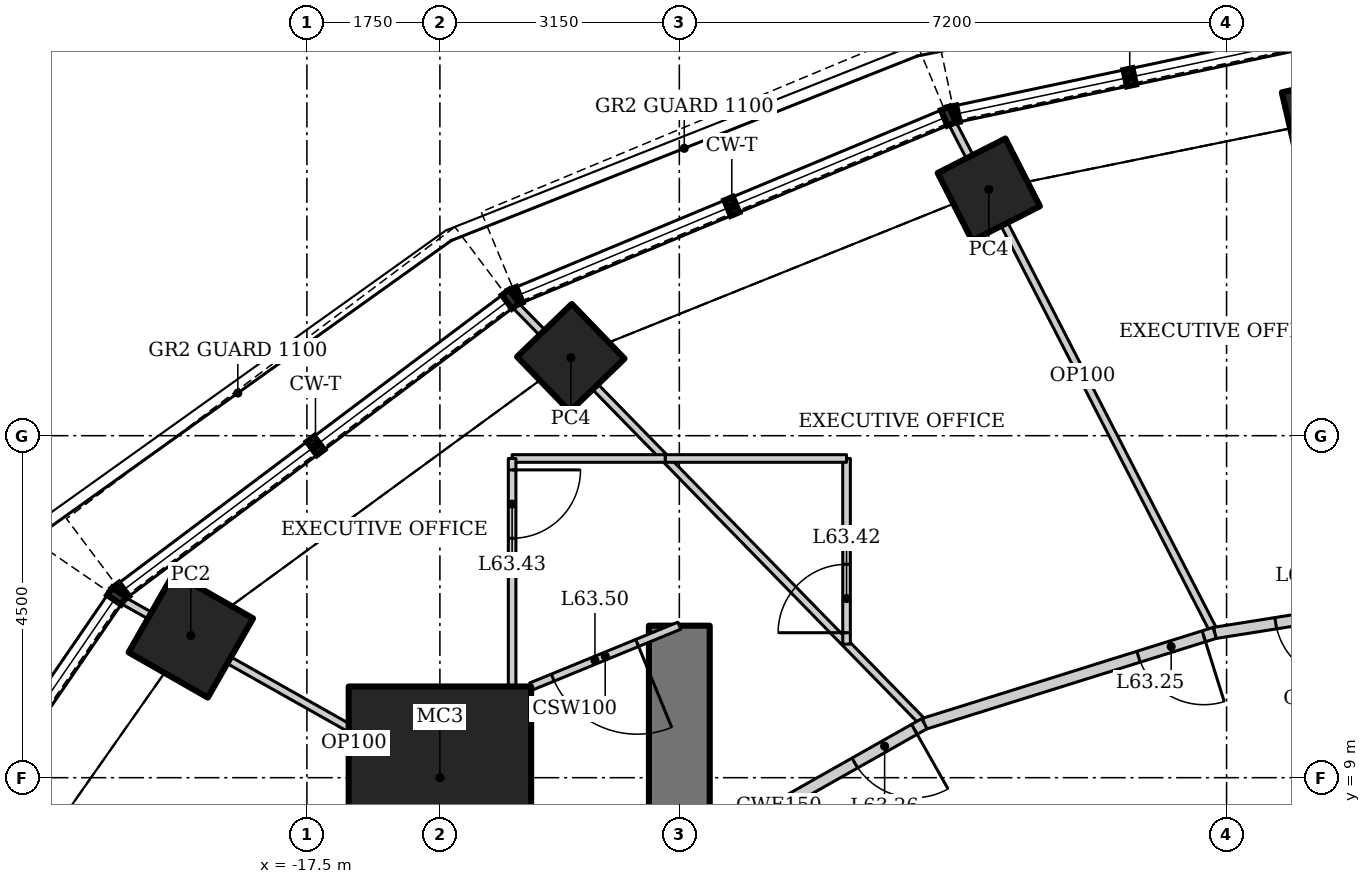
"""IFC4 building model, lengths in metres.
Left out: names, types, materials, properties, quantities, classifications, styles, units other than length and angle.
Written with IfcOpenShell. Run it as: python <this file> out.ifc"""

import sys

from ifc_helpers import new_model, si_unit, direction, frame, frame_2d, origin, origin_2d, place, context, subcontext, project, spatial, rectangle, hollow_rectangle, extrude, element, fill, save


model = new_model("IFC4")
c1 = context("Model", 3, precision=1e-05, world=origin(), true_north=direction((0.0, 1.0)))
c2 = subcontext(c1, "Body", "Model", "MODEL_VIEW")
j1 = project(units=[si_unit("LENGTHUNIT", "METRE"), si_unit("PLANEANGLEUNIT", "RADIAN")], contexts=[c1])
p1 = place(None, origin())
s1 = spatial("IfcSite", under=j1, at=p1, CompositionType="ELEMENT")
p2 = place(p1, origin())
s2 = spatial("IfcBuilding", under=s1, at=p2, CompositionType="ELEMENT")
p3 = place(p2, frame((0.0, 0.0, 270.4)))
s3 = spatial("IfcBuildingStorey", under=s2, at=p3, CompositionType="ELEMENT", Elevation=270.4)
p4 = place(p3, frame((-15.75, 9.0, 0.0), z_axis=(0.0, 0.0, 1.0), x_axis=(1.0, 0.0, 0.0)))
e1 = element("IfcColumn", 1, at=p4, inside=s3, PredefinedType="COLUMN", context=c2, shape_type="SweptSolid", body=[
    extrude(hollow_rectangle(XDim=2.4, YDim=2.4, WallThickness=0.12, at=origin_2d()), origin(), (0.0, 0.0, 1.0), 4.5),
])
p5 = place(p3, frame((-4.073, 17.642, 0.979), z_axis=(0.0, 0.0, 1.0), x_axis=(0.974370064785, 0.224951054344, 0.0)))
e2 = element("IfcColumn", 2, at=p5, inside=s3, PredefinedType="COLUMN", context=c2, shape_type="SweptSolid", body=[
    extrude(hollow_rectangle(XDim=1.0, YDim=1.0, WallThickness=0.08, at=origin_2d()), origin(), (0.0, 0.0, 1.0), 3.521),
])
p6 = place(p3, frame((-8.528, 16.738, 0.969), z_axis=(0.0, 0.0, 1.0), x_axis=(0.891006524188, 0.45399049974, 0.0)))
e3 = element("IfcColumn", 3, at=p6, inside=s3, PredefinedType="COLUMN", context=c2, shape_type="SweptSolid", body=[
    extrude(hollow_rectangle(XDim=1.0, YDim=1.0, WallThickness=0.08, at=origin_2d()), origin(), (0.0, 0.0, 1.0), 3.531),
])
p7 = place(p3, frame((-14.028, 14.526, 0.947), z_axis=(0.0, 0.0, 1.0), x_axis=(0.719339800339, 0.694658370459, 0.0)))
e4 = element("IfcColumn", 4, at=p7, inside=s3, PredefinedType="COLUMN", context=c2, shape_type="SweptSolid", body=[
    extrude(hollow_rectangle(XDim=1.0, YDim=1.0, WallThickness=0.08, at=origin_2d()), origin(), (0.0, 0.0, 1.0), 3.553),
])
p8 = place(p3, frame((-19.027, 10.873, 1.103), z_axis=(0.0, 0.0, 1.0), x_axis=(0.496139221777, 0.86824298017, 0.0)))
e5 = element("IfcColumn", 5, at=p8, inside=s3, PredefinedType="COLUMN", context=c2, shape_type="SweptSolid", body=[
    extrude(hollow_rectangle(XDim=1.2, YDim=1.2, WallThickness=0.1, at=origin_2d()), origin(), (0.0, 0.0, 1.0), 3.397),
])
p9 = place(p3, frame((-12.6, 11.0, 0.0), z_axis=(0.0, 0.0, 1.0), x_axis=(0.0, -1.0, 0.0)))
e6 = element("IfcWall", 6, at=p9, inside=s3, PredefinedType="SHEAR", context=c2, shape_type="SweptSolid", body=[
    extrude(rectangle(XDim=22.0, YDim=0.8, at=frame_2d((11.0, 0.0))), origin(), (0.0, 0.0, 1.0), 4.5),
])
p10 = place(p9, frame((10.1, 0.0, 0.0)))
e7 = element("IfcOpeningElement", 7, at=p10, cuts=e6, PredefinedType="OPENING", context=c2, shape_type="SweptSolid", body=[
    extrude(rectangle(XDim=1.8, YDim=2.1, at=frame_2d((0.9, 1.05))), frame((0.0, 0.41, 0.0), z_axis=(0.0, -1.0, 0.0), x_axis=(1.0, 0.0, 0.0)), (0.0, 0.0, 1.0), 0.82),
])
p11 = place(p3, frame((-9.031, 17.657, 0.0), z_axis=(0.0, 0.0, 1.0), x_axis=(0.457536153323, -0.889191019074, 0.0)))
e8 = element("IfcWall", 8, at=p11, inside=s3, PredefinedType="PARTITIONING", context=c2, shape_type="SweptSolid", body=[
    extrude(rectangle(XDim=7.594, YDim=0.1, at=frame_2d((3.797, 0.0))), origin(), (0.0, 0.0, 1.0), 3.408),
])
p12 = place(p3, frame((-14.789, 15.251, 0.0), z_axis=(0.0, 0.0, 1.0), x_axis=(0.698752653188, -0.71536335499, 0.0)))
e9 = element("IfcWall", 9, at=p12, inside=s3, PredefinedType="PARTITIONING", context=c2, shape_type="SweptSolid", body=[
    extrude(rectangle(XDim=7.746, YDim=0.1, at=frame_2d((3.873, 0.0))), origin(), (0.0, 0.0, 1.0), 3.723),
])
p13 = place(p3, frame((-19.959, 11.355, 0.0), z_axis=(0.0, 0.0, 1.0), x_axis=(0.871035125561, -0.491220734537, 0.0)))
e10 = element("IfcWall", 10, at=p13, inside=s3, PredefinedType="PARTITIONING", context=c2, shape_type="SweptSolid", body=[
    extrude(rectangle(XDim=7.753, YDim=0.1, at=frame_2d((3.877, 0.0))), origin(), (0.0, 0.0, 1.0), 3.824),
])
p14 = place(p3, frame((-2.625, 11.37, 0.0), z_axis=(0.0, 0.0, 1.0), x_axis=(-0.987659371348, -0.156617260185, 0.0)))
e11 = element("IfcWall", 11, at=p14, inside=s3, PredefinedType="PARTITIONING", context=c2, shape_type="SweptSolid", body=[
    extrude(rectangle(XDim=2.968, YDim=0.15, at=frame_2d((1.484, 0.0))), origin(), (0.0, 0.0, 1.0), 4.35),
])
p15 = place(p14, frame((1.255, 0.0, 0.0)))
e12 = element("IfcOpeningElement", 12, at=p15, cuts=e11, PredefinedType="OPENING", context=c2, shape_type="SweptSolid", body=[
    extrude(rectangle(XDim=0.9, YDim=2.1, at=frame_2d((0.45, 1.05))), frame((0.0, 0.085, 0.0), z_axis=(0.0, -1.0, 0.0), x_axis=(1.0, 0.0, 0.0)), (0.0, 0.0, 1.0), 0.17),
])
p16 = place(p3, frame((-5.556, 10.905, 0.0), z_axis=(0.0, 0.0, 1.0), x_axis=(-0.954393117131, -0.298552806004, 0.0)))
e13 = element("IfcWall", 13, at=p16, inside=s3, PredefinedType="PARTITIONING", context=c2, shape_type="SweptSolid", body=[
    extrude(rectangle(XDim=4.003, YDim=0.15, at=frame_2d((2.001, 0.0))), origin(), (0.0, 0.0, 1.0), 4.35),
])
p17 = place(p16, frame((0.15, 0.0, 0.0)))
e14 = element("IfcOpeningElement", 14, at=p17, cuts=e13, PredefinedType="OPENING", context=c2, shape_type="SweptSolid", body=[
    extrude(rectangle(XDim=0.9, YDim=2.1, at=frame_2d((0.45, 1.05))), frame((0.0, 0.085, 0.0), z_axis=(0.0, -1.0, 0.0), x_axis=(1.0, 0.0, 0.0)), (0.0, 0.0, 1.0), 0.17),
])
p18 = place(p3, frame((-9.377, 9.71, 0.0), z_axis=(0.0, 0.0, 1.0), x_axis=(-0.870593853694, -0.492002379984, 0.0)))
e15 = element("IfcWall", 15, at=p18, inside=s3, PredefinedType="PARTITIONING", context=c2, shape_type="SweptSolid", body=[
    extrude(rectangle(XDim=4.398, YDim=0.15, at=frame_2d((2.199, 0.0))), origin(), (0.0, 0.0, 1.0), 4.35),
])
p19 = place(p18, frame((0.15, 0.0, 0.0)))
e16 = element("IfcOpeningElement", 16, at=p19, cuts=e15, PredefinedType="OPENING", context=c2, shape_type="SweptSolid", body=[
    extrude(rectangle(XDim=0.9, YDim=2.1, at=frame_2d((0.45, 1.05))), frame((0.0, 0.085, 0.0), z_axis=(0.0, -1.0, 0.0), x_axis=(1.0, 0.0, 0.0)), (0.0, 0.0, 1.0), 0.17),
])
p20 = place(p3, frame((-10.4, 10.758, 0.0), z_axis=(0.0, 0.0, 1.0), x_axis=(0.0, 1.0, 0.0)))
e17 = element("IfcWall", 17, at=p20, inside=s3, PredefinedType="PARTITIONING", context=c2, shape_type="SweptSolid", body=[
    extrude(rectangle(XDim=2.442, YDim=0.1, at=frame_2d((1.221, 0.0))), origin(), (0.0, 0.0, 1.0), 4.35),
])
p21 = place(p20, frame((0.15, 0.0, 0.0)))
e18 = element("IfcOpeningElement", 18, at=p21, cuts=e17, PredefinedType="OPENING", context=c2, shape_type="SweptSolid", body=[
    extrude(rectangle(XDim=0.9, YDim=2.1, at=frame_2d((0.45, 1.05))), frame((0.0, 0.06, 0.0), z_axis=(0.0, -1.0, 0.0), x_axis=(1.0, 0.0, 0.0)), (0.0, 0.0, 1.0), 0.12),
])
p22 = place(p3, frame((-10.4, 13.2, 0.0), z_axis=(0.0, 0.0, 1.0), x_axis=(-1.0, 0.0, 0.0)))
e19 = element("IfcWall", 19, at=p22, inside=s3, PredefinedType="PARTITIONING", context=c2, shape_type="SweptSolid", body=[
    extrude(rectangle(XDim=2.386, YDim=0.1, at=frame_2d((1.193, 0.0))), origin(), (0.0, 0.0, 1.0), 4.35),
])
p23 = place(p3, frame((-12.786, 13.2, 0.0), z_axis=(0.0, 0.0, 1.0), x_axis=(-1.0, 0.0, 0.0)))
e20 = element("IfcWall", 20, at=p23, inside=s3, PredefinedType="PARTITIONING", context=c2, shape_type="SweptSolid", body=[
    extrude(rectangle(XDim=2.014, YDim=0.1, at=frame_2d((1.007, 0.0))), origin(), (0.0, 0.0, 1.0), 4.35),
])
p24 = place(p3, frame((-14.8, 13.2, 0.0), z_axis=(0.0, 0.0, 1.0), x_axis=(0.0, -1.0, 0.0)))
e21 = element("IfcWall", 21, at=p24, inside=s3, PredefinedType="PARTITIONING", context=c2, shape_type="SweptSolid", body=[
    extrude(rectangle(XDim=4.755, YDim=0.1, at=frame_2d((2.377, 0.0))), origin(), (0.0, 0.0, 1.0), 4.35),
])
p25 = place(p24, frame((0.15, 0.0, 0.0)))
e22 = element("IfcOpeningElement", 22, at=p25, cuts=e21, PredefinedType="OPENING", context=c2, shape_type="SweptSolid", body=[
    extrude(rectangle(XDim=0.9, YDim=2.1, at=frame_2d((0.45, 1.05))), frame((0.0, 0.06, 0.0), z_axis=(0.0, -1.0, 0.0), x_axis=(1.0, 0.0, 0.0)), (0.0, 0.0, 1.0), 0.12),
])
p26 = place(p3, frame((-12.6, 11.0, 0.0), z_axis=(0.0, 0.0, 1.0), x_axis=(-0.925157145479, -0.379584320237, 0.0)))
e23 = element("IfcWall", 23, at=p26, inside=s3, PredefinedType="PARTITIONING", context=c2, shape_type="SweptSolid", body=[
    extrude(rectangle(XDim=2.108, YDim=0.1, at=frame_2d((1.054, 0.0))), origin(), (0.0, 0.0, 1.0), 4.35),
])
p27 = place(p26, frame((0.6, 0.0, 0.0)))
e24 = element("IfcOpeningElement", 24, at=p27, cuts=e23, PredefinedType="OPENING", context=c2, shape_type="SweptSolid", body=[
    extrude(rectangle(XDim=1.2, YDim=2.1, at=frame_2d((0.6, 1.05))), frame((0.0, 0.06, 0.0), z_axis=(0.0, -1.0, 0.0), x_axis=(1.0, 0.0, 0.0)), (0.0, 0.0, 1.0), 0.12),
])
p28 = place(p15, origin())
e25 = element("IfcDoor", 25, at=p28, inside=s3, OperationType="SINGLE_SWING_LEFT", PredefinedType="DOOR", context=c2, shape_type="SweptSolid", body=[
    extrude(rectangle(XDim=0.9, YDim=2.1, at=frame_2d((0.45, 1.05))), frame((0.0, 0.025, 0.0), z_axis=(0.0, -1.0, 0.0), x_axis=(1.0, 0.0, 0.0)), (0.0, 0.0, 1.0), 0.05),
])
fill(e12, e25)
p29 = place(p17, origin())
e26 = element("IfcDoor", 26, at=p29, inside=s3, OperationType="SINGLE_SWING_LEFT", PredefinedType="DOOR", context=c2, shape_type="SweptSolid", body=[
    extrude(rectangle(XDim=0.9, YDim=2.1, at=frame_2d((0.45, 1.05))), frame((0.0, 0.025, 0.0), z_axis=(0.0, -1.0, 0.0), x_axis=(1.0, 0.0, 0.0)), (0.0, 0.0, 1.0), 0.05),
])
fill(e14, e26)
p30 = place(p19, origin())
e27 = element("IfcDoor", 27, at=p30, inside=s3, OperationType="SINGLE_SWING_LEFT", PredefinedType="DOOR", context=c2, shape_type="SweptSolid", body=[
    extrude(rectangle(XDim=0.9, YDim=2.1, at=frame_2d((0.45, 1.05))), frame((0.0, 0.025, 0.0), z_axis=(0.0, -1.0, 0.0), x_axis=(1.0, 0.0, 0.0)), (0.0, 0.0, 1.0), 0.05),
])
fill(e16, e27)
p31 = place(p21, origin())
e28 = element("IfcDoor", 28, at=p31, inside=s3, OperationType="SINGLE_SWING_LEFT", PredefinedType="DOOR", context=c2, shape_type="SweptSolid", body=[
    extrude(rectangle(XDim=0.9, YDim=2.1, at=frame_2d((0.45, 1.05))), frame((0.0, 0.025, 0.0), z_axis=(0.0, -1.0, 0.0), x_axis=(1.0, 0.0, 0.0)), (0.0, 0.0, 1.0), 0.05),
])
fill(e18, e28)
p32 = place(p25, origin())
e29 = element("IfcDoor", 29, at=p32, inside=s3, OperationType="SINGLE_SWING_LEFT", PredefinedType="DOOR", context=c2, shape_type="SweptSolid", body=[
    extrude(rectangle(XDim=0.9, YDim=2.1, at=frame_2d((0.45, 1.05))), frame((0.0, 0.025, 0.0), z_axis=(0.0, -1.0, 0.0), x_axis=(1.0, 0.0, 0.0)), (0.0, 0.0, 1.0), 0.05),
])
fill(e22, e29)
p33 = place(p27, origin())
e30 = element("IfcDoor", 30, at=p33, inside=s3, OperationType="DOUBLE_DOOR_DOUBLE_SWING", PredefinedType="DOOR", context=c2, shape_type="SweptSolid", body=[
    extrude(rectangle(XDim=1.2, YDim=2.1, at=frame_2d((0.6, 1.05))), frame((0.0, 0.025, 0.0), z_axis=(0.0, -1.0, 0.0), x_axis=(1.0, 0.0, 0.0)), (0.0, 0.0, 1.0), 0.05),
])
fill(e24, e30)
save(model, sys.argv[1])
